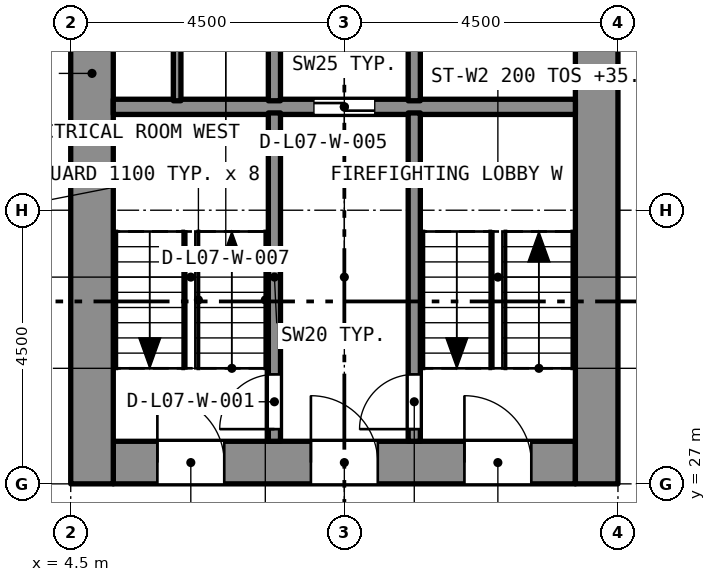
"""IFC4 building model, lengths in metres.
Left out: names, types, materials, properties, quantities, classifications, styles, units other than length and angle.
Written with IfcOpenShell. Run it as: python <this file> out.ifc"""

import sys

from ifc_helpers import new_model, si_unit, direction, frame, frame_2d, origin, place, context, subcontext, project, spatial, rectangle, extrude, element, fill, save


model = new_model("IFC4")
c1 = context("Model", 3, precision=1e-05, world=origin(), true_north=direction((0.0, 1.0)))
c2 = subcontext(c1, "Body", "Model", "MODEL_VIEW")
j1 = project(units=[si_unit("LENGTHUNIT", "METRE"), si_unit("PLANEANGLEUNIT", "RADIAN")], contexts=[c1])
p1 = place(None, origin())
s1 = spatial("IfcSite", under=j1, at=p1, CompositionType="ELEMENT")
p2 = place(p1, origin())
s2 = spatial("IfcBuilding", under=s1, at=p2, CompositionType="ELEMENT")
p3 = place(p2, frame((0.0, 0.0, 33.6)))
s3 = spatial("IfcBuildingStorey", under=s2, at=p3, CompositionType="ELEMENT", Elevation=33.6)
p4 = place(p3, frame((5.2, 27.35, 0.0), z_axis=(0.0, 0.0, 1.0), x_axis=(1.0, 0.0, 0.0)))
e1 = element("IfcWall", 1, at=p4, inside=s3, PredefinedType="SOLIDWALL", context=c2, shape_type="SweptSolid", body=[
    extrude(rectangle(XDim=7.6, YDim=0.7, at=frame_2d((3.8, 0.0))), origin(), (0.0, 0.0, 1.0), 3.2),
])
p5 = place(p4, frame((0.725, 0.0, 0.0)))
e2 = element("IfcOpeningElement", 2, at=p5, cuts=e1, PredefinedType="OPENING", context=c2, shape_type="SweptSolid", body=[
    extrude(rectangle(XDim=1.1, YDim=2.1, at=frame_2d((0.55, 1.05))), frame((0.0, 0.36, 0.0), z_axis=(0.0, -1.0, 0.0), x_axis=(1.0, 0.0, 0.0)), (0.0, 0.0, 1.0), 0.72),
])
p6 = place(p4, frame((3.25, 0.0, 0.0)))
e3 = element("IfcOpeningElement", 3, at=p6, cuts=e1, PredefinedType="OPENING", context=c2, shape_type="SweptSolid", body=[
    extrude(rectangle(XDim=1.1, YDim=2.1, at=frame_2d((0.55, 1.05))), frame((0.0, 0.36, 0.0), z_axis=(0.0, -1.0, 0.0), x_axis=(1.0, 0.0, 0.0)), (0.0, 0.0, 1.0), 0.72),
])
p7 = place(p4, frame((5.775, 0.0, 0.0)))
e4 = element("IfcOpeningElement", 4, at=p7, cuts=e1, PredefinedType="OPENING", context=c2, shape_type="SweptSolid", body=[
    extrude(rectangle(XDim=1.1, YDim=2.1, at=frame_2d((0.55, 1.05))), frame((0.0, 0.36, 0.0), z_axis=(0.0, -1.0, 0.0), x_axis=(1.0, 0.0, 0.0)), (0.0, 0.0, 1.0), 0.72),
])
p8 = place(p3, frame((4.85, 27.0, 0.0), z_axis=(0.0, 0.0, 1.0), x_axis=(0.0, 1.0, 0.0)))
e5 = element("IfcWall", 5, at=p8, inside=s3, PredefinedType="SOLIDWALL", context=c2, shape_type="SweptSolid", body=[
    extrude(rectangle(XDim=13.5, YDim=0.7, at=frame_2d((6.75, 0.0))), origin(), (0.0, 0.0, 1.0), 3.2),
])
p9 = place(p8, frame((8.95, 0.0, 0.0)))
e6 = element("IfcOpeningElement", 6, at=p9, cuts=e5, PredefinedType="OPENING", context=c2, shape_type="SweptSolid", body=[
    extrude(rectangle(XDim=1.2, YDim=2.1, at=frame_2d((0.6, 1.05))), frame((0.0, 0.36, 0.0), z_axis=(0.0, -1.0, 0.0), x_axis=(1.0, 0.0, 0.0)), (0.0, 0.0, 1.0), 0.72),
])
p10 = place(p3, frame((13.15, 27.0, 0.0), z_axis=(0.0, 0.0, 1.0), x_axis=(0.0, 1.0, 0.0)))
e7 = element("IfcWall", 7, at=p10, inside=s3, PredefinedType="SOLIDWALL", context=c2, shape_type="SweptSolid", body=[
    extrude(rectangle(XDim=13.5, YDim=0.7, at=frame_2d((6.75, 0.0))), origin(), (0.0, 0.0, 1.0), 3.2),
])
p11 = place(p10, frame((11.1, 0.0, 0.0)))
e8 = element("IfcOpeningElement", 8, at=p11, cuts=e7, PredefinedType="OPENING", context=c2, shape_type="SweptSolid", body=[
    extrude(rectangle(XDim=1.1, YDim=2.1, at=frame_2d((0.55, 1.05))), frame((0.0, 0.36, 0.0), z_axis=(0.0, -1.0, 0.0), x_axis=(1.0, 0.0, 0.0)), (0.0, 0.0, 1.0), 0.72),
])
p12 = place(p10, frame((8.95, 0.0, 0.0)))
e9 = element("IfcOpeningElement", 9, at=p12, cuts=e7, PredefinedType="OPENING", context=c2, shape_type="SweptSolid", body=[
    extrude(rectangle(XDim=1.2, YDim=2.1, at=frame_2d((0.6, 1.05))), frame((0.0, 0.36, 0.0), z_axis=(0.0, -1.0, 0.0), x_axis=(1.0, 0.0, 0.0)), (0.0, 0.0, 1.0), 0.72),
])
p13 = place(p3, frame((5.2, 33.2, 0.0), z_axis=(0.0, 0.0, 1.0), x_axis=(1.0, 0.0, 0.0)))
e10 = element("IfcWall", 10, at=p13, inside=s3, PredefinedType="SOLIDWALL", context=c2, shape_type="SweptSolid", body=[
    extrude(rectangle(XDim=7.6, YDim=0.25, at=frame_2d((3.8, 0.0))), origin(), (0.0, 0.0, 1.0), 2.9),
])
p14 = place(p13, frame((3.3, 0.0, 0.0)))
e11 = element("IfcOpeningElement", 11, at=p14, cuts=e10, PredefinedType="OPENING", context=c2, shape_type="SweptSolid", body=[
    extrude(rectangle(XDim=1.0, YDim=2.1, at=frame_2d((0.5, 1.05))), frame((0.0, 0.135, 0.0), z_axis=(0.0, -1.0, 0.0), x_axis=(1.0, 0.0, 0.0)), (0.0, 0.0, 1.0), 0.27),
])
p15 = place(p3, frame((7.85, 27.7, 0.0), z_axis=(0.0, 0.0, 1.0), x_axis=(0.0, 1.0, 0.0)))
e12 = element("IfcWall", 12, at=p15, inside=s3, PredefinedType="SOLIDWALL", context=c2, shape_type="SweptSolid", body=[
    extrude(rectangle(XDim=5.4, YDim=0.2, at=frame_2d((2.7, 0.0))), origin(), (0.0, 0.0, 1.0), 2.9),
])
p16 = place(p15, frame((0.2, 0.0, 0.0)))
e13 = element("IfcOpeningElement", 13, at=p16, cuts=e12, PredefinedType="OPENING", context=c2, shape_type="SweptSolid", body=[
    extrude(rectangle(XDim=0.9, YDim=2.1, at=frame_2d((0.45, 1.05))), frame((0.0, 0.11, 0.0), z_axis=(0.0, -1.0, 0.0), x_axis=(1.0, 0.0, 0.0)), (0.0, 0.0, 1.0), 0.22),
])
p17 = place(p3, frame((10.15, 27.7, 0.0), z_axis=(0.0, 0.0, 1.0), x_axis=(0.0, 1.0, 0.0)))
e14 = element("IfcWall", 14, at=p17, inside=s3, PredefinedType="SOLIDWALL", context=c2, shape_type="SweptSolid", body=[
    extrude(rectangle(XDim=5.4, YDim=0.2, at=frame_2d((2.7, 0.0))), origin(), (0.0, 0.0, 1.0), 2.9),
])
p18 = place(p17, frame((0.2, 0.0, 0.0)))
e15 = element("IfcOpeningElement", 15, at=p18, cuts=e14, PredefinedType="OPENING", context=c2, shape_type="SweptSolid", body=[
    extrude(rectangle(XDim=0.9, YDim=2.1, at=frame_2d((0.45, 1.05))), frame((0.0, 0.11, 0.0), z_axis=(0.0, -1.0, 0.0), x_axis=(1.0, 0.0, 0.0)), (0.0, 0.0, 1.0), 0.22),
])
for number, where, z_axis, x_axis in (
    (16, (7.85, 33.3, 0.0), (0.0, 0.0, 1.0), (0.0, 1.0, 0.0)),
    (17, (10.15, 33.3, 0.0), (0.0, 0.0, 1.0), (0.0, 1.0, 0.0)),
):
    element("IfcWall", number, at=place(p3, frame(where, z_axis=z_axis, x_axis=x_axis)), inside=s3, PredefinedType="SOLIDWALL", context=c2, shape_type="SweptSolid", body=[
        extrude(rectangle(XDim=2.3, YDim=0.2, at=frame_2d((1.15, 0.0))), origin(), (0.0, 0.0, 1.0), 2.9),
    ])
p19 = place(p3, frame((6.25, 33.3, 0.0), z_axis=(0.0, 0.0, 1.0), x_axis=(0.0, 1.0, 0.0)))
e18 = element("IfcWall", 18, at=p19, inside=s3, PredefinedType="PARTITIONING", context=c2, shape_type="SweptSolid", body=[
    extrude(rectangle(XDim=2.3, YDim=0.125, at=frame_2d((1.15, 0.0))), origin(), (0.0, 0.0, 1.0), 2.9),
])
p20 = place(p16, origin())
e19 = element("IfcDoor", 19, at=p20, inside=s3, OperationType="SINGLE_SWING_LEFT", PredefinedType="DOOR", context=c2, shape_type="SweptSolid", body=[
    extrude(rectangle(XDim=0.9, YDim=2.1, at=frame_2d((0.45, 1.05))), frame((0.0, 0.025, 0.0), z_axis=(0.0, -1.0, 0.0), x_axis=(1.0, 0.0, 0.0)), (0.0, 0.0, 1.0), 0.05),
])
fill(e13, e19)
p21 = place(p18, origin())
e20 = element("IfcDoor", 20, at=p21, inside=s3, OperationType="SINGLE_SWING_LEFT", PredefinedType="DOOR", context=c2, shape_type="SweptSolid", body=[
    extrude(rectangle(XDim=0.9, YDim=2.1, at=frame_2d((0.45, 1.05))), frame((0.0, 0.025, 0.0), z_axis=(0.0, -1.0, 0.0), x_axis=(1.0, 0.0, 0.0)), (0.0, 0.0, 1.0), 0.05),
])
fill(e15, e20)
p22 = place(p14, origin())
e21 = element("IfcDoor", 21, at=p22, inside=s3, OperationType="SLIDING_TO_LEFT", PredefinedType="DOOR", context=c2, shape_type="SweptSolid", body=[
    extrude(rectangle(XDim=1.0, YDim=2.1, at=frame_2d((0.5, 1.05))), frame((0.0, 0.025, 0.0), z_axis=(0.0, -1.0, 0.0), x_axis=(1.0, 0.0, 0.0)), (0.0, 0.0, 1.0), 0.05),
])
fill(e11, e21)
p23 = place(p5, origin())
e22 = element("IfcDoor", 22, at=p23, inside=s3, OperationType="SINGLE_SWING_LEFT", PredefinedType="DOOR", context=c2, shape_type="SweptSolid", body=[
    extrude(rectangle(XDim=1.1, YDim=2.1, at=frame_2d((0.55, 1.05))), frame((0.0, 0.025, 0.0), z_axis=(0.0, -1.0, 0.0), x_axis=(1.0, 0.0, 0.0)), (0.0, 0.0, 1.0), 0.05),
])
fill(e2, e22)
p24 = place(p6, origin())
e23 = element("IfcDoor", 23, at=p24, inside=s3, OperationType="SINGLE_SWING_LEFT", PredefinedType="DOOR", context=c2, shape_type="SweptSolid", body=[
    extrude(rectangle(XDim=1.1, YDim=2.1, at=frame_2d((0.55, 1.05))), frame((0.0, 0.025, 0.0), z_axis=(0.0, -1.0, 0.0), x_axis=(1.0, 0.0, 0.0)), (0.0, 0.0, 1.0), 0.05),
])
fill(e3, e23)
p25 = place(p7, origin())
e24 = element("IfcDoor", 24, at=p25, inside=s3, OperationType="SINGLE_SWING_LEFT", PredefinedType="DOOR", context=c2, shape_type="SweptSolid", body=[
    extrude(rectangle(XDim=1.1, YDim=2.1, at=frame_2d((0.55, 1.05))), frame((0.0, 0.025, 0.0), z_axis=(0.0, -1.0, 0.0), x_axis=(1.0, 0.0, 0.0)), (0.0, 0.0, 1.0), 0.05),
])
fill(e4, e24)
save(model, sys.argv[1])
